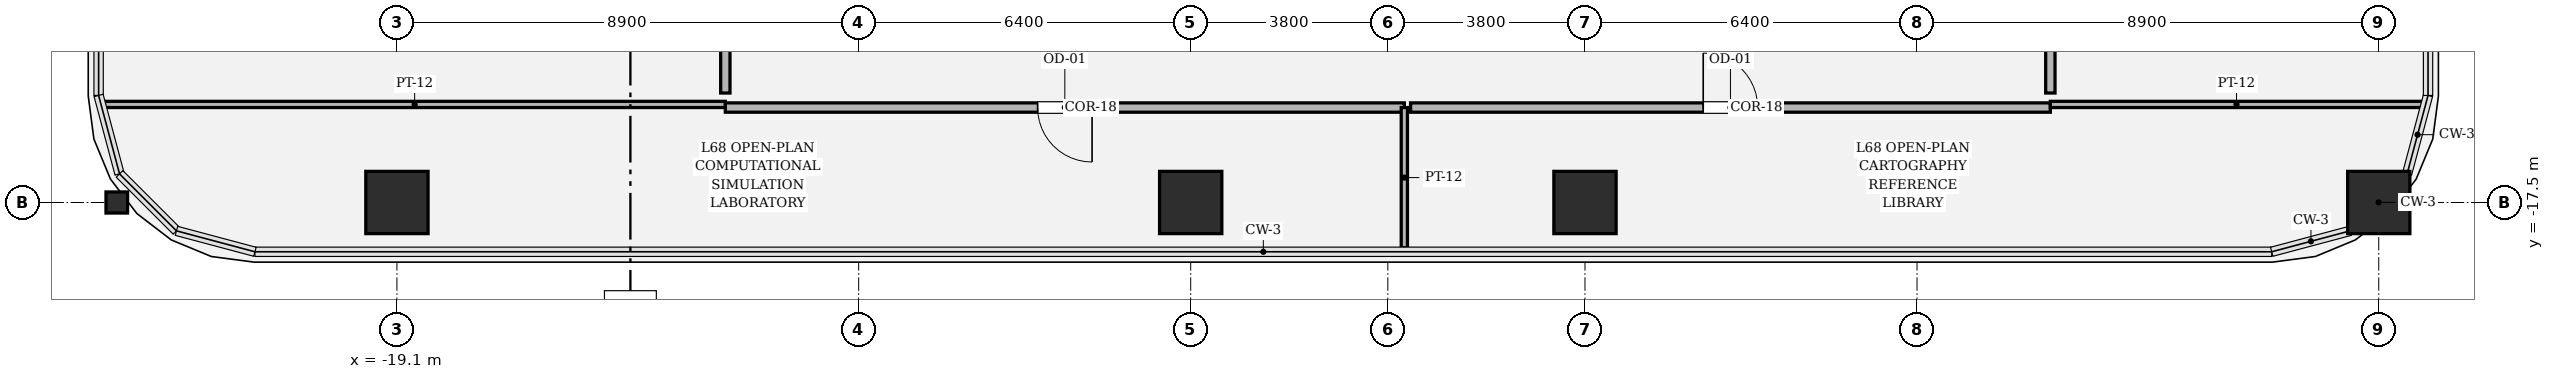
"""IFC4 building model, lengths in metres.
Left out: names, types, materials, properties, quantities, classifications, styles, units other than length and angle.
Written with IfcOpenShell. Run it as: python <this file> out.ifc"""

import sys

from ifc_helpers import new_model, si_unit, direction, frame, frame_2d, origin, origin_2d, place, context, subcontext, project, spatial, rectangle, hollow_rectangle, i_section, extrude, element, fill, save


model = new_model("IFC4")
c1 = context("Model", 3, precision=1e-05, world=origin(), true_north=direction((0.0, 1.0)))
c2 = subcontext(c1, "Body", "Model", "MODEL_VIEW")
j1 = project(units=[si_unit("LENGTHUNIT", "METRE"), si_unit("PLANEANGLEUNIT", "RADIAN")], contexts=[c1])
p1 = place(None, origin())
s1 = spatial("IfcSite", under=j1, at=p1, CompositionType="ELEMENT")
p2 = place(p1, origin())
s2 = spatial("IfcBuilding", under=s1, at=p2, CompositionType="ELEMENT")
p3 = place(p2, frame((0.0, 0.0, 288.0)))
s3 = spatial("IfcBuildingStorey", under=s2, at=p3, CompositionType="ELEMENT", Elevation=288.0)
for number, where, z_axis, x_axis in (
    (1, (-19.1, -17.5, 0.0), (0.0, 0.0, 1.0), (1.0, 0.0, 0.0)),
    (2, (-3.8, -17.5, 0.0), (0.0, 0.0, 1.0), (1.0, 0.0, 0.0)),
    (3, (3.8, -17.5, 0.0), (0.0, 0.0, 1.0), (1.0, 0.0, 0.0)),
    (4, (19.1, -17.5, 0.0), (0.0, 0.0, 1.0), (1.0, 0.0, 0.0)),
):
    element("IfcColumn", number, at=place(p3, frame(where, z_axis=z_axis, x_axis=x_axis)), inside=s3, PredefinedType="COLUMN", context=c2, shape_type="SweptSolid", body=[
        extrude(hollow_rectangle(XDim=1.2, YDim=1.2, WallThickness=0.035, at=origin_2d()), origin(), (0.0, 0.0, 1.0), 4.2),
    ])
p4 = place(p3, frame((-24.5, -17.5, 0.0), z_axis=(0.0, 0.0, 1.0), x_axis=(0.0, 1.0, 0.0)))
e5 = element("IfcColumn", 5, at=p4, inside=s3, PredefinedType="COLUMN", context=c2, shape_type="SweptSolid", body=[
    extrude(i_section(OverallWidth=0.406, OverallDepth=0.416, WebThickness=0.029, FlangeThickness=0.048, FilletRadius=0.018, at=origin_2d()), origin(), (0.0, 0.0, 1.0), 4.198),
])
p5 = place(p3, frame((-24.747, -15.61, 0.0), z_axis=(0.0, 0.0, 1.0), x_axis=(1.0, 0.0, 0.0)))
e6 = element("IfcWall", 6, at=p5, inside=s3, PredefinedType="PARTITIONING", context=c2, shape_type="SweptSolid", body=[
    extrude(rectangle(XDim=11.977, YDim=0.12, at=frame_2d((5.988, 0.0))), origin(), (0.0, 0.0, 1.0), 2.714),
])
p6 = place(p3, frame((-12.77, -15.67, 0.0), z_axis=(0.0, 0.0, 1.0), x_axis=(1.0, 0.0, 0.0)))
e7 = element("IfcWall", 7, at=p6, inside=s3, PredefinedType="PARTITIONING", context=c2, shape_type="SweptSolid", body=[
    extrude(rectangle(XDim=13.088, YDim=0.18, at=frame_2d((6.544, 0.0))), origin(), (0.0, 0.0, 1.0), 3.394),
])
p7 = place(p6, frame((6.019, 0.0, 0.0)))
e8 = element("IfcOpeningElement", 8, at=p7, cuts=e7, PredefinedType="OPENING", context=c2, shape_type="SweptSolid", body=[
    extrude(rectangle(XDim=1.05, YDim=2.2, at=frame_2d((0.525, 1.1))), frame((0.0, 0.1, 0.0), z_axis=(0.0, -1.0, 0.0), x_axis=(1.0, 0.0, 0.0)), (0.0, 0.0, 1.0), 0.2),
])
p8 = place(p3, frame((0.318, -15.67, 0.0), z_axis=(0.0, 0.0, 1.0), x_axis=(0.0, -1.0, 0.0)))
e9 = element("IfcWall", 9, at=p8, inside=s3, PredefinedType="PARTITIONING", context=c2, shape_type="SweptSolid", body=[
    extrude(rectangle(XDim=2.7, YDim=0.12, at=frame_2d((1.35, 0.0))), origin(), (0.0, 0.0, 1.0), 3.394),
])
p9 = place(p3, frame((0.438, -15.67, 0.0), z_axis=(0.0, 0.0, 1.0), x_axis=(1.0, 0.0, 0.0)))
e10 = element("IfcWall", 10, at=p9, inside=s3, PredefinedType="PARTITIONING", context=c2, shape_type="SweptSolid", body=[
    extrude(rectangle(XDim=12.332, YDim=0.18, at=frame_2d((6.166, 0.0))), origin(), (0.0, 0.0, 1.0), 3.394),
])
p10 = place(p9, frame((5.641, 0.0, 0.0)))
e11 = element("IfcOpeningElement", 11, at=p10, cuts=e10, PredefinedType="OPENING", context=c2, shape_type="SweptSolid", body=[
    extrude(rectangle(XDim=1.05, YDim=2.2, at=frame_2d((0.525, 1.1))), frame((0.0, 0.1, 0.0), z_axis=(0.0, -1.0, 0.0), x_axis=(1.0, 0.0, 0.0)), (0.0, 0.0, 1.0), 0.2),
])
p11 = place(p3, frame((12.77, -15.61, 0.0), z_axis=(0.0, 0.0, 1.0), x_axis=(1.0, 0.0, 0.0)))
e12 = element("IfcWall", 12, at=p11, inside=s3, PredefinedType="PARTITIONING", context=c2, shape_type="SweptSolid", body=[
    extrude(rectangle(XDim=7.177, YDim=0.12, at=frame_2d((3.588, 0.0))), origin(), (0.0, 0.0, 1.0), 3.394),
])
for number, where, z_axis, x_axis in (
    (13, (-12.77, -13.38, 0.0), (0.0, 0.0, 1.0), (0.0, -1.0, 0.0)),
    (14, (12.77, -15.39, 0.0), (0.0, 0.0, 1.0), (0.0, 1.0, 0.0)),
):
    element("IfcWall", number, at=place(p3, frame(where, z_axis=z_axis, x_axis=x_axis)), inside=s3, PredefinedType="PARTITIONING", context=c2, shape_type="SweptSolid", body=[
        extrude(rectangle(XDim=2.01, YDim=0.18, at=frame_2d((1.005, 0.0))), origin(), (0.0, 0.0, 1.0), 3.634),
    ])
p12 = place(p7, origin())
e15 = element("IfcDoor", 15, at=p12, inside=s3, OperationType="SINGLE_SWING_RIGHT", PredefinedType="DOOR", context=c2, shape_type="SweptSolid", body=[
    extrude(rectangle(XDim=1.05, YDim=2.2, at=frame_2d((0.525, 1.1))), frame((0.0, 0.025, 0.0), z_axis=(0.0, -1.0, 0.0), x_axis=(1.0, 0.0, 0.0)), (0.0, 0.0, 1.0), 0.05),
])
fill(e8, e15)
p13 = place(p10, origin())
e16 = element("IfcDoor", 16, at=p13, inside=s3, OperationType="SINGLE_SWING_LEFT", PredefinedType="DOOR", context=c2, shape_type="SweptSolid", body=[
    extrude(rectangle(XDim=1.05, YDim=2.2, at=frame_2d((0.525, 1.1))), frame((0.0, 0.025, 0.0), z_axis=(0.0, -1.0, 0.0), x_axis=(1.0, 0.0, 0.0)), (0.0, 0.0, 1.0), 0.05),
])
fill(e11, e16)
save(model, sys.argv[1])
